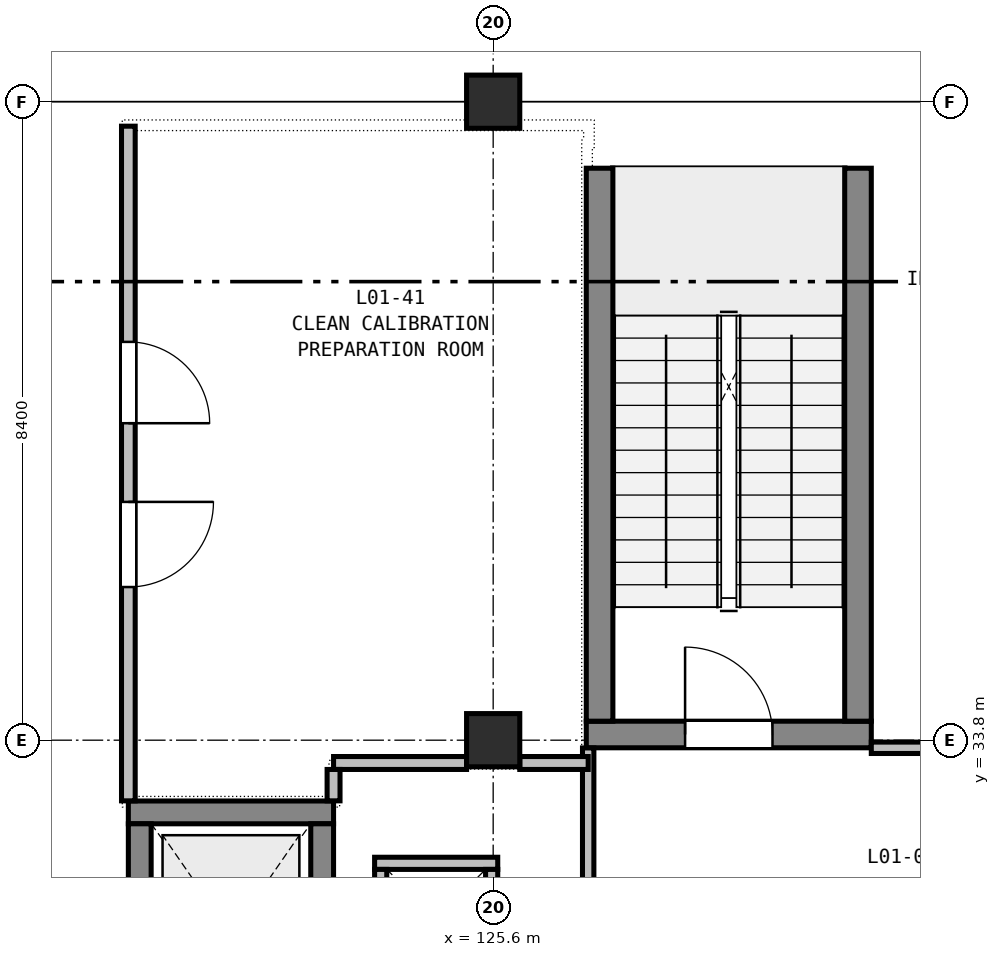
"""IFC4 building model, lengths in metres.
Left out: names, types, materials, properties, quantities, classifications, styles, units other than length and angle.
Written with IfcOpenShell. Run it as: python <this file> out.ifc"""

import sys

from ifc_helpers import new_model, si_unit, direction, frame, frame_2d, origin, origin_2d, place, context, subcontext, project, spatial, rectangle, extrude, element, fill, save


model = new_model("IFC4")
c1 = context("Model", 3, precision=1e-05, world=origin(), true_north=direction((0.0, 1.0)))
c2 = subcontext(c1, "Body", "Model", "MODEL_VIEW")
j1 = project(units=[si_unit("LENGTHUNIT", "METRE"), si_unit("PLANEANGLEUNIT", "RADIAN")], contexts=[c1])
p1 = place(None, origin())
s1 = spatial("IfcSite", under=j1, at=p1, CompositionType="ELEMENT")
p2 = place(p1, origin())
s2 = spatial("IfcBuilding", under=s1, at=p2, CompositionType="ELEMENT")
p3 = place(p2, frame((0.0, 0.0, 5.4)))
s3 = spatial("IfcBuildingStorey", under=s2, at=p3, CompositionType="ELEMENT", Elevation=5.4)
for number, where, z_axis, x_axis in (
    (1, (125.6, 33.8, 0.0), (0.0, 0.0, 1.0), (1.0, 0.0, 0.0)),
    (2, (125.6, 42.2, 0.0), (0.0, 0.0, 1.0), (1.0, 0.0, 0.0)),
):
    element("IfcColumn", number, at=place(p3, frame(where, z_axis=z_axis, x_axis=x_axis)), inside=s3, PredefinedType="COLUMN", context=c2, shape_type="SweptSolid", body=[
        extrude(rectangle(XDim=0.7, YDim=0.7, at=origin_2d()), origin(), (0.0, 0.0, 1.0), 4.8),
    ])
p4 = place(p3, frame((126.825, 33.875, 0.0), z_axis=(0.0, 0.0, 1.0), x_axis=(1.0, 0.0, 0.0)))
e3 = element("IfcWall", 3, at=p4, inside=s3, PredefinedType="SHEAR", context=c2, shape_type="SweptSolid", body=[
    extrude(rectangle(XDim=3.75, YDim=0.35, at=frame_2d((1.875, 0.0))), origin(), (0.0, 0.0, 1.0), 4.8),
])
p5 = place(p4, frame((1.3, 0.0, 0.0)))
e4 = element("IfcOpeningElement", 4, at=p5, cuts=e3, PredefinedType="OPENING", context=c2, shape_type="SweptSolid", body=[
    extrude(rectangle(XDim=1.15, YDim=2.15, at=frame_2d((0.575, 1.075))), frame((0.0, 0.185, 0.0), z_axis=(0.0, -1.0, 0.0), x_axis=(1.0, 0.0, 0.0)), (0.0, 0.0, 1.0), 0.37),
])
p6 = place(p3, frame((126.825, 41.5, 0.0), z_axis=(0.0, 0.0, 1.0), x_axis=(1.0, 0.0, 0.0)))
e5 = element("IfcWall", 5, at=p6, inside=s3, PredefinedType="SHEAR", context=c2, shape_type="SweptSolid", body=[
    extrude(rectangle(XDim=3.75, YDim=0.35, at=frame_2d((1.875, 0.0))), origin(), (0.0, 0.0, 1.0), 4.8),
])
for number, where, z_axis, x_axis in (
    (6, (127.0, 34.05, 0.0), (0.0, 0.0, 1.0), (0.0, 1.0, 0.0)),
    (7, (130.4, 34.05, 0.0), (0.0, 0.0, 1.0), (0.0, 1.0, 0.0)),
):
    element("IfcWall", number, at=place(p3, frame(where, z_axis=z_axis, x_axis=x_axis)), inside=s3, PredefinedType="SHEAR", context=c2, shape_type="SweptSolid", body=[
        extrude(rectangle(XDim=7.275, YDim=0.35, at=frame_2d((3.637, 0.0))), origin(), (0.0, 0.0, 1.0), 4.8),
    ])
p7 = place(p3, frame((120.8, 32.85, 0.0), z_axis=(0.0, 0.0, 1.0), x_axis=(1.0, 0.0, 0.0)))
e8 = element("IfcWall", 8, at=p7, inside=s3, PredefinedType="SHEAR", context=c2, shape_type="SweptSolid", body=[
    extrude(rectangle(XDim=2.7, YDim=0.3, at=frame_2d((1.35, 0.0))), origin(), (0.0, 0.0, 1.0), 4.8),
])
p8 = place(p3, frame((120.95, 29.8, 0.0), z_axis=(0.0, 0.0, 1.0), x_axis=(0.0, 1.0, 0.0)))
e9 = element("IfcWall", 9, at=p8, inside=s3, PredefinedType="SHEAR", context=c2, shape_type="SweptSolid", body=[
    extrude(rectangle(XDim=2.9, YDim=0.3, at=frame_2d((1.45, 0.0))), origin(), (0.0, 0.0, 1.0), 4.8),
])
p9 = place(p3, frame((123.35, 29.8, 0.0), z_axis=(0.0, 0.0, 1.0), x_axis=(0.0, 1.0, 0.0)))
e10 = element("IfcWall", 10, at=p9, inside=s3, PredefinedType="SHEAR", context=c2, shape_type="SweptSolid", body=[
    extrude(rectangle(XDim=2.9, YDim=0.3, at=frame_2d((1.45, 0.0))), origin(), (0.0, 0.0, 1.0), 4.8),
])
p10 = place(p9, frame((0.75, 0.0, 0.0)))
e11 = element("IfcOpeningElement", 11, at=p10, cuts=e10, PredefinedType="OPENING", context=c2, shape_type="SweptSolid", body=[
    extrude(rectangle(XDim=1.4, YDim=2.2, at=frame_2d((0.7, 1.1))), frame((0.0, 0.16, 0.0), z_axis=(0.0, -1.0, 0.0), x_axis=(1.0, 0.0, 0.0)), (0.0, 0.0, 1.0), 0.32),
])
p11 = place(p3, frame((119.0, 42.04, 0.0), z_axis=(0.0, 0.0, 1.0), x_axis=(1.0, 0.0, 0.0)))
e12 = element("IfcWall", 12, at=p11, inside=s3, PredefinedType="STANDARD", context=c2, shape_type="SweptSolid", body=[
    extrude(rectangle(XDim=6.6, YDim=0.32, at=frame_2d((3.3, 0.0))), origin(), (0.0, 0.0, 1.0), 3.935),
])
p12 = place(p11, frame((2.04, 0.0, 0.9)))
e13 = element("IfcOpeningElement", 13, at=p12, cuts=e12, PredefinedType="OPENING", context=c2, shape_type="SweptSolid", body=[
    extrude(rectangle(XDim=1.35, YDim=2.1, at=frame_2d((0.675, 1.05))), frame((0.0, 0.17, 0.0), z_axis=(0.0, -1.0, 0.0), x_axis=(1.0, 0.0, 0.0)), (0.0, 0.0, 1.0), 0.34),
])
p13 = place(p11, frame((4.143, 0.0, 0.9)))
e14 = element("IfcOpeningElement", 14, at=p13, cuts=e12, PredefinedType="OPENING", context=c2, shape_type="SweptSolid", body=[
    extrude(rectangle(XDim=1.35, YDim=2.1, at=frame_2d((0.675, 1.05))), frame((0.0, 0.17, 0.0), z_axis=(0.0, -1.0, 0.0), x_axis=(1.0, 0.0, 0.0)), (0.0, 0.0, 1.0), 0.34),
])
p14 = place(p3, frame((125.6, 42.04, 0.0), z_axis=(0.0, 0.0, 1.0), x_axis=(1.0, 0.0, 0.0)))
e15 = element("IfcWall", 15, at=p14, inside=s3, PredefinedType="STANDARD", context=c2, shape_type="SweptSolid", body=[
    extrude(rectangle(XDim=0.52, YDim=0.32, at=frame_2d((0.26, 0.0))), origin(), (0.0, 0.0, 1.0), 3.935),
])
p15 = place(p3, frame((124.04, 32.18, 0.0), z_axis=(0.0, 0.0, 1.0), x_axis=(1.0, 0.0, 0.0)))
e16 = element("IfcWall", 16, at=p15, inside=s3, PredefinedType="PARTITIONING", context=c2, shape_type="SweptSolid", body=[
    extrude(rectangle(XDim=1.62, YDim=0.16, at=frame_2d((0.81, 0.0))), origin(), (0.0, 0.0, 1.0), 3.935),
])
p16 = place(p3, frame((124.12, 30.8, 0.0), z_axis=(0.0, 0.0, 1.0), x_axis=(0.0, 1.0, 0.0)))
e17 = element("IfcWall", 17, at=p16, inside=s3, PredefinedType="PARTITIONING", context=c2, shape_type="SweptSolid", body=[
    extrude(rectangle(XDim=1.3, YDim=0.16, at=frame_2d((0.65, 0.0))), origin(), (0.0, 0.0, 1.0), 4.445),
])
p17 = place(p3, frame((125.58, 30.8, 0.0), z_axis=(0.0, 0.0, 1.0), x_axis=(0.0, 1.0, 0.0)))
e18 = element("IfcWall", 18, at=p17, inside=s3, PredefinedType="PARTITIONING", context=c2, shape_type="SweptSolid", body=[
    extrude(rectangle(XDim=1.3, YDim=0.16, at=frame_2d((0.65, 0.0))), origin(), (0.0, 0.0, 1.0), 3.935),
])
p18 = place(p3, frame((130.575, 33.7, 0.0), z_axis=(0.0, 0.0, 1.0), x_axis=(1.0, 0.0, 0.0)))
e19 = element("IfcWall", 19, at=p18, inside=s3, PredefinedType="PARTITIONING", context=c2, shape_type="SweptSolid", body=[
    extrude(rectangle(XDim=1.275, YDim=0.15, at=frame_2d((0.638, 0.0))), origin(), (0.0, 0.0, 1.0), 4.135),
])
p19 = place(p3, frame((126.85, 30.1, 0.0), z_axis=(0.0, 0.0, 1.0), x_axis=(0.0, 1.0, 0.0)))
e20 = element("IfcWall", 20, at=p19, inside=s3, PredefinedType="PARTITIONING", context=c2, shape_type="SweptSolid", body=[
    extrude(rectangle(XDim=3.598, YDim=0.15, at=frame_2d((1.799, 0.0))), origin(), (0.0, 0.0, 1.0), 4.135),
])
p20 = place(p3, frame((120.8, 41.878, 0.0), z_axis=(0.0, 0.0, 1.0), x_axis=(0.0, -1.0, 0.0)))
e21 = element("IfcWall", 21, at=p20, inside=s3, PredefinedType="PARTITIONING", context=c2, shape_type="SweptSolid", body=[
    extrude(rectangle(XDim=8.876, YDim=0.18, at=frame_2d((4.438, 0.0))), origin(), (0.0, 0.0, 1.0), 4.085),
])
p21 = place(p20, frame((2.838, 0.0, 0.0)))
e22 = element("IfcOpeningElement", 22, at=p21, cuts=e21, PredefinedType="OPENING", context=c2, shape_type="SweptSolid", body=[
    extrude(rectangle(XDim=1.07, YDim=2.1, at=frame_2d((0.535, 1.05))), frame((0.0, 0.1, 0.0), z_axis=(0.0, -1.0, 0.0), x_axis=(1.0, 0.0, 0.0)), (0.0, 0.0, 1.0), 0.2),
])
p22 = place(p20, frame((4.943, 0.0, 0.0)))
e23 = element("IfcOpeningElement", 23, at=p22, cuts=e21, PredefinedType="OPENING", context=c2, shape_type="SweptSolid", body=[
    extrude(rectangle(XDim=1.12, YDim=2.1, at=frame_2d((0.56, 1.05))), frame((0.0, 0.1, 0.0), z_axis=(0.0, -1.0, 0.0), x_axis=(1.0, 0.0, 0.0)), (0.0, 0.0, 1.0), 0.2),
])
p23 = place(p3, frame((126.85, 33.5, 0.0), z_axis=(0.0, 0.0, 1.0), x_axis=(-1.0, 0.0, 0.0)))
e24 = element("IfcWall", 24, at=p23, inside=s3, PredefinedType="PARTITIONING", context=c2, shape_type="SweptSolid", body=[
    extrude(rectangle(XDim=0.9, YDim=0.17, at=frame_2d((0.45, 0.0))), origin(), (0.0, 0.0, 1.0), 3.935),
])
p24 = place(p3, frame((125.25, 33.5, 0.0), z_axis=(0.0, 0.0, 1.0), x_axis=(-1.0, 0.0, 0.0)))
e25 = element("IfcWall", 25, at=p24, inside=s3, PredefinedType="PARTITIONING", context=c2, shape_type="SweptSolid", body=[
    extrude(rectangle(XDim=1.75, YDim=0.17, at=frame_2d((0.875, 0.0))), origin(), (0.0, 0.0, 1.0), 3.935),
])
p25 = place(p3, frame((123.5, 33.415, 0.0), z_axis=(0.0, 0.0, 1.0), x_axis=(0.0, -1.0, 0.0)))
e26 = element("IfcWall", 26, at=p25, inside=s3, PredefinedType="PARTITIONING", context=c2, shape_type="SweptSolid", body=[
    extrude(rectangle(XDim=0.413, YDim=0.17, at=frame_2d((0.207, 0.0))), origin(), (0.0, 0.0, 1.0), 4.445),
])
p26 = place(p12, origin())
e27 = element("IfcWindow", 27, at=p26, inside=s3, PartitioningType="SINGLE_PANEL", PredefinedType="WINDOW", context=c2, shape_type="SweptSolid", body=[
    extrude(rectangle(XDim=1.35, YDim=2.1, at=frame_2d((0.675, 1.05))), frame((0.0, 0.03, 0.0), z_axis=(0.0, -1.0, 0.0), x_axis=(1.0, 0.0, 0.0)), (0.0, 0.0, 1.0), 0.06),
])
fill(e13, e27)
p27 = place(p13, origin())
e28 = element("IfcWindow", 28, at=p27, inside=s3, PartitioningType="SINGLE_PANEL", PredefinedType="WINDOW", context=c2, shape_type="SweptSolid", body=[
    extrude(rectangle(XDim=1.35, YDim=2.1, at=frame_2d((0.675, 1.05))), frame((0.0, 0.03, 0.0), z_axis=(0.0, -1.0, 0.0), x_axis=(1.0, 0.0, 0.0)), (0.0, 0.0, 1.0), 0.06),
])
fill(e14, e28)
p28 = place(p5, origin())
e29 = element("IfcDoor", 29, at=p28, inside=s3, OperationType="SINGLE_SWING_LEFT", PredefinedType="DOOR", context=c2, shape_type="SweptSolid", body=[
    extrude(rectangle(XDim=1.15, YDim=2.15, at=frame_2d((0.575, 1.075))), frame((0.0, 0.025, 0.0), z_axis=(0.0, -1.0, 0.0), x_axis=(1.0, 0.0, 0.0)), (0.0, 0.0, 1.0), 0.05),
])
fill(e4, e29)
p29 = place(p21, origin())
e30 = element("IfcDoor", 30, at=p29, inside=s3, OperationType="SINGLE_SWING_RIGHT", PredefinedType="DOOR", context=c2, shape_type="SweptSolid", body=[
    extrude(rectangle(XDim=1.07, YDim=2.1, at=frame_2d((0.535, 1.05))), frame((0.0, 0.025, 0.0), z_axis=(0.0, -1.0, 0.0), x_axis=(1.0, 0.0, 0.0)), (0.0, 0.0, 1.0), 0.05),
])
fill(e22, e30)
p30 = place(p22, origin())
e31 = element("IfcDoor", 31, at=p30, inside=s3, OperationType="SINGLE_SWING_LEFT", PredefinedType="DOOR", context=c2, shape_type="SweptSolid", body=[
    extrude(rectangle(XDim=1.12, YDim=2.1, at=frame_2d((0.56, 1.05))), frame((0.0, 0.025, 0.0), z_axis=(0.0, -1.0, 0.0), x_axis=(1.0, 0.0, 0.0)), (0.0, 0.0, 1.0), 0.05),
])
fill(e23, e31)
save(model, sys.argv[1])
